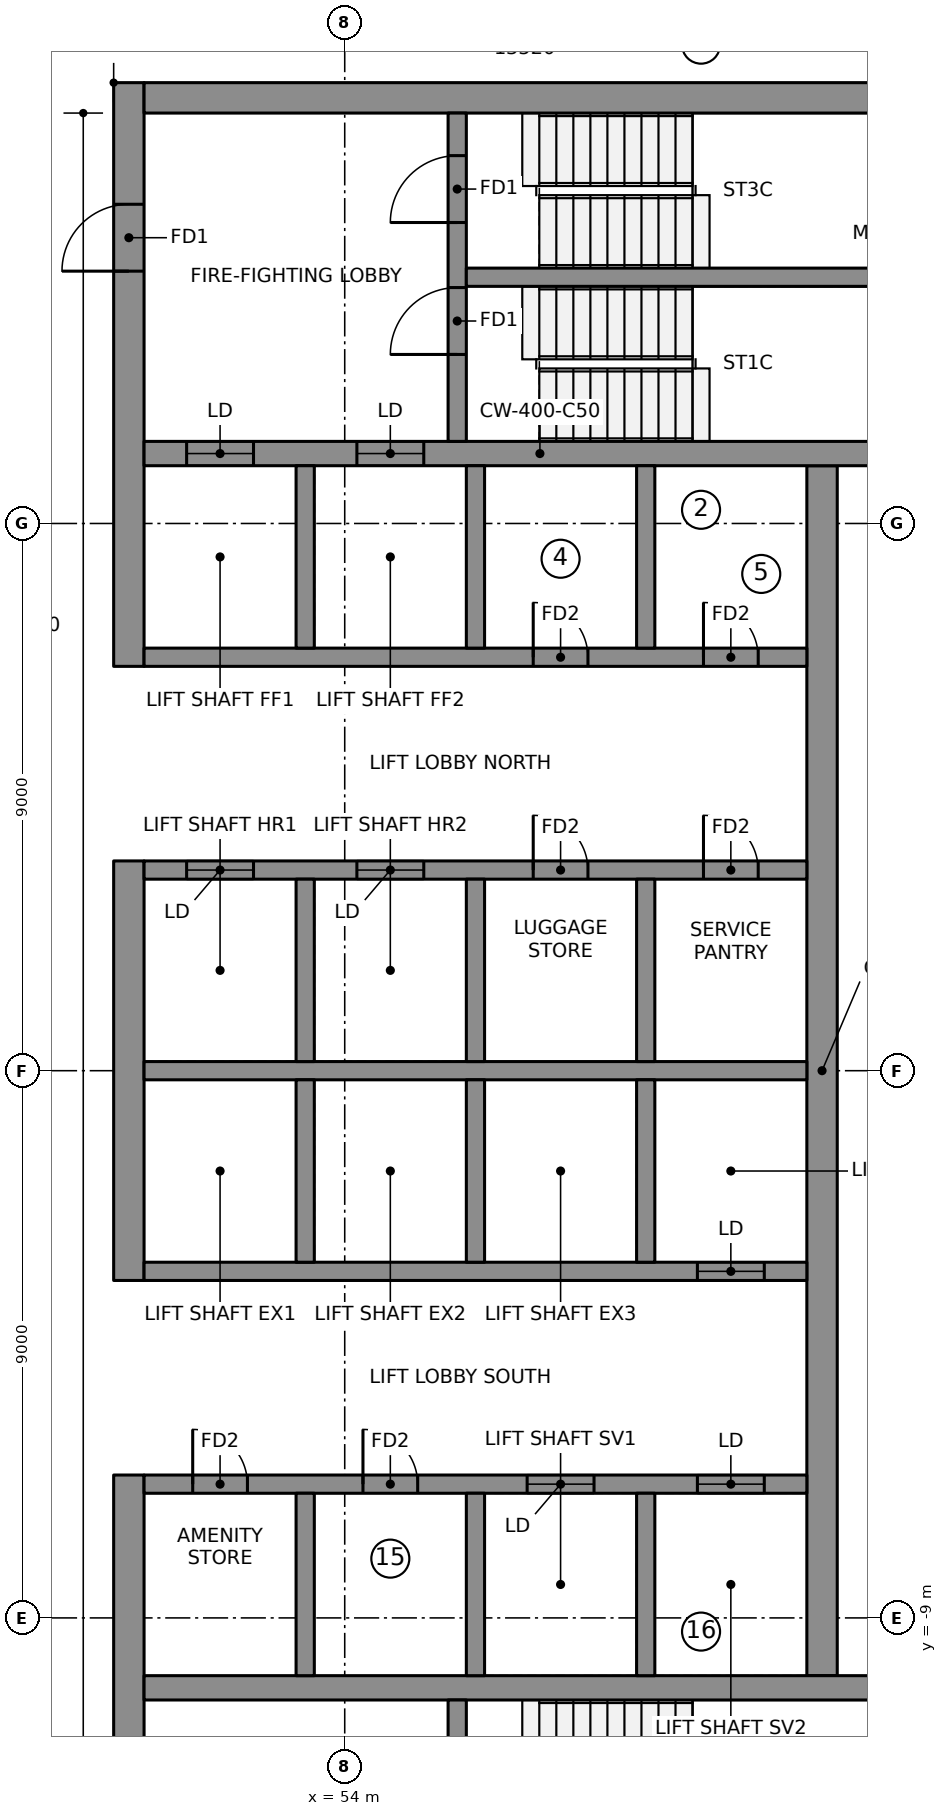
"""IFC4 building model, lengths in metres.
Left out: names, types, materials, properties, quantities, classifications, styles, units other than length and angle.
Written with IfcOpenShell. Run it as: python <this file> out.ifc"""

import sys

from ifc_helpers import new_model, si_unit, direction, frame, frame_2d, origin, place, context, subcontext, project, spatial, rectangle, extrude, element, fill, save


model = new_model("IFC4")
c1 = context("Model", 3, precision=1e-05, world=origin(), true_north=direction((0.0, 1.0)))
c2 = subcontext(c1, "Body", "Model", "MODEL_VIEW")
j1 = project(units=[si_unit("LENGTHUNIT", "METRE"), si_unit("PLANEANGLEUNIT", "RADIAN")], contexts=[c1])
p1 = place(None, origin())
s1 = spatial("IfcSite", under=j1, at=p1, CompositionType="ELEMENT")
p2 = place(p1, origin())
s2 = spatial("IfcBuilding", under=s1, at=p2, CompositionType="ELEMENT")
p3 = place(p2, frame((0.0, 0.0, 299.85)))
s3 = spatial("IfcBuildingStorey", under=s2, at=p3, CompositionType="ELEMENT", Elevation=299.85)
p4 = place(p3, frame((50.45, 6.65, 0.0), z_axis=(0.0, 0.0, 1.0), x_axis=(0.0, 1.0, 0.0)))
e1 = element("IfcWall", 1, at=p4, inside=s3, PredefinedType="SHEAR", context=c2, shape_type="SweptSolid", body=[
    extrude(rectangle(XDim=9.6, YDim=0.5, at=frame_2d((4.8, 0.0))), origin(), (0.0, 0.0, 1.0), 3.55),
])
p5 = place(p4, frame((6.5, 0.0, 0.0)))
e2 = element("IfcOpeningElement", 2, at=p5, cuts=e1, PredefinedType="OPENING", context=c2, shape_type="SweptSolid", body=[
    extrude(rectangle(XDim=1.1, YDim=2.1, at=frame_2d((0.55, 1.05))), frame((0.0, 0.26, 0.0), z_axis=(0.0, -1.0, 0.0), x_axis=(1.0, 0.0, 0.0)), (0.0, 0.0, 1.0), 0.52),
])
p6 = place(p3, frame((50.45, -3.45, 0.0), z_axis=(0.0, 0.0, 1.0), x_axis=(0.0, 1.0, 0.0)))
e3 = element("IfcWall", 3, at=p6, inside=s3, PredefinedType="SHEAR", context=c2, shape_type="SweptSolid", body=[
    extrude(rectangle(XDim=6.9, YDim=0.5, at=frame_2d((3.45, 0.0))), origin(), (0.0, 0.0, 1.0), 3.55),
])
p7 = place(p3, frame((50.45, -16.25, 0.0), z_axis=(0.0, 0.0, 1.0), x_axis=(0.0, 1.0, 0.0)))
e4 = element("IfcWall", 4, at=p7, inside=s3, PredefinedType="SHEAR", context=c2, shape_type="SweptSolid", body=[
    extrude(rectangle(XDim=9.6, YDim=0.5, at=frame_2d((4.8, 0.0))), origin(), (0.0, 0.0, 1.0), 3.55),
])
p8 = place(p7, frame((2.0, 0.0, 0.0)))
e5 = element("IfcOpeningElement", 5, at=p8, cuts=e4, PredefinedType="OPENING", context=c2, shape_type="SweptSolid", body=[
    extrude(rectangle(XDim=1.1, YDim=2.1, at=frame_2d((0.55, 1.05))), frame((0.0, 0.26, 0.0), z_axis=(0.0, -1.0, 0.0), x_axis=(1.0, 0.0, 0.0)), (0.0, 0.0, 1.0), 0.52),
])
p9 = place(p3, frame((50.7, 16.0, 0.0), z_axis=(0.0, 0.0, 1.0), x_axis=(1.0, 0.0, 0.0)))
e6 = element("IfcWall", 6, at=p9, inside=s3, PredefinedType="SHEAR", context=c2, shape_type="SweptSolid", body=[
    extrude(rectangle(XDim=13.52, YDim=0.5, at=frame_2d((6.76, 0.0))), origin(), (0.0, 0.0, 1.0), 3.55),
])
p10 = place(p3, frame((61.85, -9.95, 0.0), z_axis=(0.0, 0.0, 1.0), x_axis=(0.0, 1.0, 0.0)))
e7 = element("IfcWall", 7, at=p10, inside=s3, PredefinedType="SHEAR", context=c2, shape_type="SweptSolid", body=[
    extrude(rectangle(XDim=19.9, YDim=0.5, at=frame_2d((9.95, 0.0))), origin(), (0.0, 0.0, 1.0), 3.55),
])
p11 = place(p3, frame((50.7, 10.15, 0.0), z_axis=(0.0, 0.0, 1.0), x_axis=(1.0, 0.0, 0.0)))
e8 = element("IfcWall", 8, at=p11, inside=s3, PredefinedType="SHEAR", context=c2, shape_type="SweptSolid", body=[
    extrude(rectangle(XDim=13.02, YDim=0.4, at=frame_2d((6.51, 0.0))), origin(), (0.0, 0.0, 1.0), 3.55),
])
p12 = place(p11, frame((0.7, 0.0, 0.0)))
e9 = element("IfcOpeningElement", 9, at=p12, cuts=e8, PredefinedType="OPENING", context=c2, shape_type="SweptSolid", body=[
    extrude(rectangle(XDim=1.1, YDim=2.1, at=frame_2d((0.55, 1.05))), frame((0.0, 0.21, 0.0), z_axis=(0.0, -1.0, 0.0), x_axis=(1.0, 0.0, 0.0)), (0.0, 0.0, 1.0), 0.42),
])
p13 = place(p11, frame((3.5, 0.0, 0.0)))
e10 = element("IfcOpeningElement", 10, at=p13, cuts=e8, PredefinedType="OPENING", context=c2, shape_type="SweptSolid", body=[
    extrude(rectangle(XDim=1.1, YDim=2.1, at=frame_2d((0.55, 1.05))), frame((0.0, 0.21, 0.0), z_axis=(0.0, -1.0, 0.0), x_axis=(1.0, 0.0, 0.0)), (0.0, 0.0, 1.0), 0.42),
])
p14 = place(p3, frame((50.7, -10.15, 0.0), z_axis=(0.0, 0.0, 1.0), x_axis=(1.0, 0.0, 0.0)))
e11 = element("IfcWall", 11, at=p14, inside=s3, PredefinedType="SHEAR", context=c2, shape_type="SweptSolid", body=[
    extrude(rectangle(XDim=13.02, YDim=0.4, at=frame_2d((6.51, 0.0))), origin(), (0.0, 0.0, 1.0), 3.55),
])
p15 = place(p3, frame((50.7, 0.0, 0.0), z_axis=(0.0, 0.0, 1.0), x_axis=(1.0, 0.0, 0.0)))
e12 = element("IfcWall", 12, at=p15, inside=s3, PredefinedType="SHEAR", context=c2, shape_type="SweptSolid", body=[
    extrude(rectangle(XDim=10.9, YDim=0.3, at=frame_2d((5.45, 0.0))), origin(), (0.0, 0.0, 1.0), 3.55),
])
p16 = place(p3, frame((50.7, 3.3, 0.0), z_axis=(0.0, 0.0, 1.0), x_axis=(1.0, 0.0, 0.0)))
e13 = element("IfcWall", 13, at=p16, inside=s3, PredefinedType="SHEAR", context=c2, shape_type="SweptSolid", body=[
    extrude(rectangle(XDim=10.9, YDim=0.3, at=frame_2d((5.45, 0.0))), origin(), (0.0, 0.0, 1.0), 3.55),
])
p17 = place(p16, frame((0.7, 0.0, 0.0)))
e14 = element("IfcOpeningElement", 14, at=p17, cuts=e13, PredefinedType="OPENING", context=c2, shape_type="SweptSolid", body=[
    extrude(rectangle(XDim=1.1, YDim=2.1, at=frame_2d((0.55, 1.05))), frame((0.0, 0.16, 0.0), z_axis=(0.0, -1.0, 0.0), x_axis=(1.0, 0.0, 0.0)), (0.0, 0.0, 1.0), 0.32),
])
p18 = place(p16, frame((3.5, 0.0, 0.0)))
e15 = element("IfcOpeningElement", 15, at=p18, cuts=e13, PredefinedType="OPENING", context=c2, shape_type="SweptSolid", body=[
    extrude(rectangle(XDim=1.1, YDim=2.1, at=frame_2d((0.55, 1.05))), frame((0.0, 0.16, 0.0), z_axis=(0.0, -1.0, 0.0), x_axis=(1.0, 0.0, 0.0)), (0.0, 0.0, 1.0), 0.32),
])
p19 = place(p16, frame((6.4, 0.0, 0.0)))
e16 = element("IfcOpeningElement", 16, at=p19, cuts=e13, PredefinedType="OPENING", context=c2, shape_type="SweptSolid", body=[
    extrude(rectangle(XDim=0.9, YDim=2.1, at=frame_2d((0.45, 1.05))), frame((0.0, 0.16, 0.0), z_axis=(0.0, -1.0, 0.0), x_axis=(1.0, 0.0, 0.0)), (0.0, 0.0, 1.0), 0.32),
])
p20 = place(p16, frame((9.2, 0.0, 0.0)))
e17 = element("IfcOpeningElement", 17, at=p20, cuts=e13, PredefinedType="OPENING", context=c2, shape_type="SweptSolid", body=[
    extrude(rectangle(XDim=0.9, YDim=2.1, at=frame_2d((0.45, 1.05))), frame((0.0, 0.16, 0.0), z_axis=(0.0, -1.0, 0.0), x_axis=(1.0, 0.0, 0.0)), (0.0, 0.0, 1.0), 0.32),
])
p21 = place(p3, frame((50.7, 6.8, 0.0), z_axis=(0.0, 0.0, 1.0), x_axis=(1.0, 0.0, 0.0)))
e18 = element("IfcWall", 18, at=p21, inside=s3, PredefinedType="SHEAR", context=c2, shape_type="SweptSolid", body=[
    extrude(rectangle(XDim=10.9, YDim=0.3, at=frame_2d((5.45, 0.0))), origin(), (0.0, 0.0, 1.0), 3.55),
])
p22 = place(p21, frame((6.4, 0.0, 0.0)))
e19 = element("IfcOpeningElement", 19, at=p22, cuts=e18, PredefinedType="OPENING", context=c2, shape_type="SweptSolid", body=[
    extrude(rectangle(XDim=0.9, YDim=2.1, at=frame_2d((0.45, 1.05))), frame((0.0, 0.16, 0.0), z_axis=(0.0, -1.0, 0.0), x_axis=(1.0, 0.0, 0.0)), (0.0, 0.0, 1.0), 0.32),
])
p23 = place(p21, frame((9.2, 0.0, 0.0)))
e20 = element("IfcOpeningElement", 20, at=p23, cuts=e18, PredefinedType="OPENING", context=c2, shape_type="SweptSolid", body=[
    extrude(rectangle(XDim=0.9, YDim=2.1, at=frame_2d((0.45, 1.05))), frame((0.0, 0.16, 0.0), z_axis=(0.0, -1.0, 0.0), x_axis=(1.0, 0.0, 0.0)), (0.0, 0.0, 1.0), 0.32),
])
for number, where, z_axis, x_axis in (
    (21, (53.35, 0.15, 0.0), (0.0, 0.0, 1.0), (0.0, 1.0, 0.0)),
    (22, (53.35, 6.95, 0.0), (0.0, 0.0, 1.0), (0.0, 1.0, 0.0)),
    (23, (56.15, 0.15, 0.0), (0.0, 0.0, 1.0), (0.0, 1.0, 0.0)),
    (24, (56.15, 6.95, 0.0), (0.0, 0.0, 1.0), (0.0, 1.0, 0.0)),
    (25, (58.95, 0.15, 0.0), (0.0, 0.0, 1.0), (0.0, 1.0, 0.0)),
    (26, (58.95, 6.95, 0.0), (0.0, 0.0, 1.0), (0.0, 1.0, 0.0)),
):
    element("IfcWall", number, at=place(p3, frame(where, z_axis=z_axis, x_axis=x_axis)), inside=s3, PredefinedType="SHEAR", context=c2, shape_type="SweptSolid", body=[
        extrude(rectangle(XDim=3.0, YDim=0.3, at=frame_2d((1.5, 0.0))), origin(), (0.0, 0.0, 1.0), 3.55),
    ])
p24 = place(p3, frame((50.7, -3.3, 0.0), z_axis=(0.0, 0.0, 1.0), x_axis=(1.0, 0.0, 0.0)))
e27 = element("IfcWall", 27, at=p24, inside=s3, PredefinedType="SHEAR", context=c2, shape_type="SweptSolid", body=[
    extrude(rectangle(XDim=10.9, YDim=0.3, at=frame_2d((5.45, 0.0))), origin(), (0.0, 0.0, 1.0), 3.55),
])
p25 = place(p24, frame((9.1, 0.0, 0.0)))
e28 = element("IfcOpeningElement", 28, at=p25, cuts=e27, PredefinedType="OPENING", context=c2, shape_type="SweptSolid", body=[
    extrude(rectangle(XDim=1.1, YDim=2.1, at=frame_2d((0.55, 1.05))), frame((0.0, 0.16, 0.0), z_axis=(0.0, -1.0, 0.0), x_axis=(1.0, 0.0, 0.0)), (0.0, 0.0, 1.0), 0.32),
])
p26 = place(p3, frame((50.7, -6.8, 0.0), z_axis=(0.0, 0.0, 1.0), x_axis=(1.0, 0.0, 0.0)))
e29 = element("IfcWall", 29, at=p26, inside=s3, PredefinedType="SHEAR", context=c2, shape_type="SweptSolid", body=[
    extrude(rectangle(XDim=10.9, YDim=0.3, at=frame_2d((5.45, 0.0))), origin(), (0.0, 0.0, 1.0), 3.55),
])
p27 = place(p26, frame((6.3, 0.0, 0.0)))
e30 = element("IfcOpeningElement", 30, at=p27, cuts=e29, PredefinedType="OPENING", context=c2, shape_type="SweptSolid", body=[
    extrude(rectangle(XDim=1.1, YDim=2.1, at=frame_2d((0.55, 1.05))), frame((0.0, 0.16, 0.0), z_axis=(0.0, -1.0, 0.0), x_axis=(1.0, 0.0, 0.0)), (0.0, 0.0, 1.0), 0.32),
])
p28 = place(p26, frame((9.1, 0.0, 0.0)))
e31 = element("IfcOpeningElement", 31, at=p28, cuts=e29, PredefinedType="OPENING", context=c2, shape_type="SweptSolid", body=[
    extrude(rectangle(XDim=1.1, YDim=2.1, at=frame_2d((0.55, 1.05))), frame((0.0, 0.16, 0.0), z_axis=(0.0, -1.0, 0.0), x_axis=(1.0, 0.0, 0.0)), (0.0, 0.0, 1.0), 0.32),
])
p29 = place(p26, frame((0.8, 0.0, 0.0)))
e32 = element("IfcOpeningElement", 32, at=p29, cuts=e29, PredefinedType="OPENING", context=c2, shape_type="SweptSolid", body=[
    extrude(rectangle(XDim=0.9, YDim=2.1, at=frame_2d((0.45, 1.05))), frame((0.0, 0.16, 0.0), z_axis=(0.0, -1.0, 0.0), x_axis=(1.0, 0.0, 0.0)), (0.0, 0.0, 1.0), 0.32),
])
p30 = place(p26, frame((3.6, 0.0, 0.0)))
e33 = element("IfcOpeningElement", 33, at=p30, cuts=e29, PredefinedType="OPENING", context=c2, shape_type="SweptSolid", body=[
    extrude(rectangle(XDim=0.9, YDim=2.1, at=frame_2d((0.45, 1.05))), frame((0.0, 0.16, 0.0), z_axis=(0.0, -1.0, 0.0), x_axis=(1.0, 0.0, 0.0)), (0.0, 0.0, 1.0), 0.32),
])
for number, where, z_axis, x_axis in (
    (34, (53.35, -3.15, 0.0), (0.0, 0.0, 1.0), (0.0, 1.0, 0.0)),
    (35, (53.35, -9.95, 0.0), (0.0, 0.0, 1.0), (0.0, 1.0, 0.0)),
    (36, (56.15, -3.15, 0.0), (0.0, 0.0, 1.0), (0.0, 1.0, 0.0)),
    (37, (56.15, -9.95, 0.0), (0.0, 0.0, 1.0), (0.0, 1.0, 0.0)),
    (38, (58.95, -3.15, 0.0), (0.0, 0.0, 1.0), (0.0, 1.0, 0.0)),
    (39, (58.95, -9.95, 0.0), (0.0, 0.0, 1.0), (0.0, 1.0, 0.0)),
):
    element("IfcWall", number, at=place(p3, frame(where, z_axis=z_axis, x_axis=x_axis)), inside=s3, PredefinedType="SHEAR", context=c2, shape_type="SweptSolid", body=[
        extrude(rectangle(XDim=3.0, YDim=0.3, at=frame_2d((1.5, 0.0))), origin(), (0.0, 0.0, 1.0), 3.55),
    ])
p31 = place(p3, frame((55.85, 10.35, 0.0), z_axis=(0.0, 0.0, 1.0), x_axis=(0.0, 1.0, 0.0)))
e40 = element("IfcWall", 40, at=p31, inside=s3, PredefinedType="SHEAR", context=c2, shape_type="SweptSolid", body=[
    extrude(rectangle(XDim=5.4, YDim=0.3, at=frame_2d((2.7, 0.0))), origin(), (0.0, 0.0, 1.0), 3.55),
])
p32 = place(p31, frame((1.43, 0.0, 0.0)))
e41 = element("IfcOpeningElement", 41, at=p32, cuts=e40, PredefinedType="OPENING", context=c2, shape_type="SweptSolid", body=[
    extrude(rectangle(XDim=1.1, YDim=2.1, at=frame_2d((0.55, 1.05))), frame((0.0, 0.16, 0.0), z_axis=(0.0, -1.0, 0.0), x_axis=(1.0, 0.0, 0.0)), (0.0, 0.0, 1.0), 0.32),
])
p33 = place(p31, frame((3.6, 0.0, 0.0)))
e42 = element("IfcOpeningElement", 42, at=p33, cuts=e40, PredefinedType="OPENING", context=c2, shape_type="SweptSolid", body=[
    extrude(rectangle(XDim=1.1, YDim=2.1, at=frame_2d((0.55, 1.05))), frame((0.0, 0.16, 0.0), z_axis=(0.0, -1.0, 0.0), x_axis=(1.0, 0.0, 0.0)), (0.0, 0.0, 1.0), 0.32),
])
p34 = place(p3, frame((55.85, -15.75, 0.0), z_axis=(0.0, 0.0, 1.0), x_axis=(0.0, 1.0, 0.0)))
e43 = element("IfcWall", 43, at=p34, inside=s3, PredefinedType="SHEAR", context=c2, shape_type="SweptSolid", body=[
    extrude(rectangle(XDim=5.4, YDim=0.3, at=frame_2d((2.7, 0.0))), origin(), (0.0, 0.0, 1.0), 3.55),
])
p35 = place(p34, frame((3.6, 0.0, 0.0)))
e44 = element("IfcOpeningElement", 44, at=p35, cuts=e43, PredefinedType="OPENING", context=c2, shape_type="SweptSolid", body=[
    extrude(rectangle(XDim=1.1, YDim=2.1, at=frame_2d((0.55, 1.05))), frame((0.0, 0.16, 0.0), z_axis=(0.0, -1.0, 0.0), x_axis=(1.0, 0.0, 0.0)), (0.0, 0.0, 1.0), 0.32),
])
p36 = place(p34, frame((0.8, 0.0, 0.0)))
e45 = element("IfcOpeningElement", 45, at=p36, cuts=e43, PredefinedType="OPENING", context=c2, shape_type="SweptSolid", body=[
    extrude(rectangle(XDim=0.9, YDim=2.1, at=frame_2d((0.45, 1.05))), frame((0.0, 0.16, 0.0), z_axis=(0.0, -1.0, 0.0), x_axis=(1.0, 0.0, 0.0)), (0.0, 0.0, 1.0), 0.32),
])
p37 = place(p3, frame((56.0, 13.05, 0.0), z_axis=(0.0, 0.0, 1.0), x_axis=(1.0, 0.0, 0.0)))
e46 = element("IfcWall", 46, at=p37, inside=s3, PredefinedType="SHEAR", context=c2, shape_type="SweptSolid", body=[
    extrude(rectangle(XDim=7.72, YDim=0.3, at=frame_2d((3.86, 0.0))), origin(), (0.0, 0.0, 1.0), 3.55),
])
p38 = place(p12, origin())
e47 = element("IfcDoor", 47, at=p38, inside=s3, OperationType="DOUBLE_DOOR_SLIDING", PredefinedType="DOOR", context=c2, shape_type="SweptSolid", body=[
    extrude(rectangle(XDim=1.1, YDim=2.1, at=frame_2d((0.55, 1.05))), frame((0.0, 0.025, 0.0), z_axis=(0.0, -1.0, 0.0), x_axis=(1.0, 0.0, 0.0)), (0.0, 0.0, 1.0), 0.05),
])
fill(e9, e47)
p39 = place(p13, origin())
e48 = element("IfcDoor", 48, at=p39, inside=s3, OperationType="DOUBLE_DOOR_SLIDING", PredefinedType="DOOR", context=c2, shape_type="SweptSolid", body=[
    extrude(rectangle(XDim=1.1, YDim=2.1, at=frame_2d((0.55, 1.05))), frame((0.0, 0.025, 0.0), z_axis=(0.0, -1.0, 0.0), x_axis=(1.0, 0.0, 0.0)), (0.0, 0.0, 1.0), 0.05),
])
fill(e10, e48)
p40 = place(p17, origin())
e49 = element("IfcDoor", 49, at=p40, inside=s3, OperationType="DOUBLE_DOOR_SLIDING", PredefinedType="DOOR", context=c2, shape_type="SweptSolid", body=[
    extrude(rectangle(XDim=1.1, YDim=2.1, at=frame_2d((0.55, 1.05))), frame((0.0, 0.025, 0.0), z_axis=(0.0, -1.0, 0.0), x_axis=(1.0, 0.0, 0.0)), (0.0, 0.0, 1.0), 0.05),
])
fill(e14, e49)
p41 = place(p18, origin())
e50 = element("IfcDoor", 50, at=p41, inside=s3, OperationType="DOUBLE_DOOR_SLIDING", PredefinedType="DOOR", context=c2, shape_type="SweptSolid", body=[
    extrude(rectangle(XDim=1.1, YDim=2.1, at=frame_2d((0.55, 1.05))), frame((0.0, 0.025, 0.0), z_axis=(0.0, -1.0, 0.0), x_axis=(1.0, 0.0, 0.0)), (0.0, 0.0, 1.0), 0.05),
])
fill(e15, e50)
p42 = place(p25, origin())
e51 = element("IfcDoor", 51, at=p42, inside=s3, OperationType="DOUBLE_DOOR_SLIDING", PredefinedType="DOOR", context=c2, shape_type="SweptSolid", body=[
    extrude(rectangle(XDim=1.1, YDim=2.1, at=frame_2d((0.55, 1.05))), frame((0.0, 0.025, 0.0), z_axis=(0.0, -1.0, 0.0), x_axis=(1.0, 0.0, 0.0)), (0.0, 0.0, 1.0), 0.05),
])
fill(e28, e51)
p43 = place(p27, origin())
e52 = element("IfcDoor", 52, at=p43, inside=s3, OperationType="DOUBLE_DOOR_SLIDING", PredefinedType="DOOR", context=c2, shape_type="SweptSolid", body=[
    extrude(rectangle(XDim=1.1, YDim=2.1, at=frame_2d((0.55, 1.05))), frame((0.0, 0.025, 0.0), z_axis=(0.0, -1.0, 0.0), x_axis=(1.0, 0.0, 0.0)), (0.0, 0.0, 1.0), 0.05),
])
fill(e30, e52)
p44 = place(p28, origin())
e53 = element("IfcDoor", 53, at=p44, inside=s3, OperationType="DOUBLE_DOOR_SLIDING", PredefinedType="DOOR", context=c2, shape_type="SweptSolid", body=[
    extrude(rectangle(XDim=1.1, YDim=2.1, at=frame_2d((0.55, 1.05))), frame((0.0, 0.025, 0.0), z_axis=(0.0, -1.0, 0.0), x_axis=(1.0, 0.0, 0.0)), (0.0, 0.0, 1.0), 0.05),
])
fill(e31, e53)
p45 = place(p32, origin())
e54 = element("IfcDoor", 54, at=p45, inside=s3, OperationType="SINGLE_SWING_RIGHT", PredefinedType="DOOR", context=c2, shape_type="SweptSolid", body=[
    extrude(rectangle(XDim=1.1, YDim=2.1, at=frame_2d((0.55, 1.05))), frame((0.0, 0.025, 0.0), z_axis=(0.0, -1.0, 0.0), x_axis=(1.0, 0.0, 0.0)), (0.0, 0.0, 1.0), 0.05),
])
fill(e41, e54)
p46 = place(p33, origin())
e55 = element("IfcDoor", 55, at=p46, inside=s3, OperationType="SINGLE_SWING_RIGHT", PredefinedType="DOOR", context=c2, shape_type="SweptSolid", body=[
    extrude(rectangle(XDim=1.1, YDim=2.1, at=frame_2d((0.55, 1.05))), frame((0.0, 0.025, 0.0), z_axis=(0.0, -1.0, 0.0), x_axis=(1.0, 0.0, 0.0)), (0.0, 0.0, 1.0), 0.05),
])
fill(e42, e55)
p47 = place(p5, origin())
e56 = element("IfcDoor", 56, at=p47, inside=s3, OperationType="SINGLE_SWING_RIGHT", PredefinedType="DOOR", context=c2, shape_type="SweptSolid", body=[
    extrude(rectangle(XDim=1.1, YDim=2.1, at=frame_2d((0.55, 1.05))), frame((0.0, 0.025, 0.0), z_axis=(0.0, -1.0, 0.0), x_axis=(1.0, 0.0, 0.0)), (0.0, 0.0, 1.0), 0.05),
])
fill(e2, e56)
p48 = place(p22, origin())
e57 = element("IfcDoor", 57, at=p48, inside=s3, OperationType="SINGLE_SWING_LEFT", PredefinedType="DOOR", context=c2, shape_type="SweptSolid", body=[
    extrude(rectangle(XDim=0.9, YDim=2.1, at=frame_2d((0.45, 1.05))), frame((0.0, 0.025, 0.0), z_axis=(0.0, -1.0, 0.0), x_axis=(1.0, 0.0, 0.0)), (0.0, 0.0, 1.0), 0.05),
])
fill(e19, e57)
p49 = place(p23, origin())
e58 = element("IfcDoor", 58, at=p49, inside=s3, OperationType="SINGLE_SWING_LEFT", PredefinedType="DOOR", context=c2, shape_type="SweptSolid", body=[
    extrude(rectangle(XDim=0.9, YDim=2.1, at=frame_2d((0.45, 1.05))), frame((0.0, 0.025, 0.0), z_axis=(0.0, -1.0, 0.0), x_axis=(1.0, 0.0, 0.0)), (0.0, 0.0, 1.0), 0.05),
])
fill(e20, e58)
p50 = place(p19, origin())
e59 = element("IfcDoor", 59, at=p50, inside=s3, OperationType="SINGLE_SWING_LEFT", PredefinedType="DOOR", context=c2, shape_type="SweptSolid", body=[
    extrude(rectangle(XDim=0.9, YDim=2.1, at=frame_2d((0.45, 1.05))), frame((0.0, 0.025, 0.0), z_axis=(0.0, -1.0, 0.0), x_axis=(1.0, 0.0, 0.0)), (0.0, 0.0, 1.0), 0.05),
])
fill(e16, e59)
p51 = place(p20, origin())
e60 = element("IfcDoor", 60, at=p51, inside=s3, OperationType="SINGLE_SWING_LEFT", PredefinedType="DOOR", context=c2, shape_type="SweptSolid", body=[
    extrude(rectangle(XDim=0.9, YDim=2.1, at=frame_2d((0.45, 1.05))), frame((0.0, 0.025, 0.0), z_axis=(0.0, -1.0, 0.0), x_axis=(1.0, 0.0, 0.0)), (0.0, 0.0, 1.0), 0.05),
])
fill(e17, e60)
p52 = place(p29, origin())
e61 = element("IfcDoor", 61, at=p52, inside=s3, OperationType="SINGLE_SWING_LEFT", PredefinedType="DOOR", context=c2, shape_type="SweptSolid", body=[
    extrude(rectangle(XDim=0.9, YDim=2.1, at=frame_2d((0.45, 1.05))), frame((0.0, 0.025, 0.0), z_axis=(0.0, -1.0, 0.0), x_axis=(1.0, 0.0, 0.0)), (0.0, 0.0, 1.0), 0.05),
])
fill(e32, e61)
p53 = place(p30, origin())
e62 = element("IfcDoor", 62, at=p53, inside=s3, OperationType="SINGLE_SWING_LEFT", PredefinedType="DOOR", context=c2, shape_type="SweptSolid", body=[
    extrude(rectangle(XDim=0.9, YDim=2.1, at=frame_2d((0.45, 1.05))), frame((0.0, 0.025, 0.0), z_axis=(0.0, -1.0, 0.0), x_axis=(1.0, 0.0, 0.0)), (0.0, 0.0, 1.0), 0.05),
])
fill(e33, e62)
save(model, sys.argv[1])
